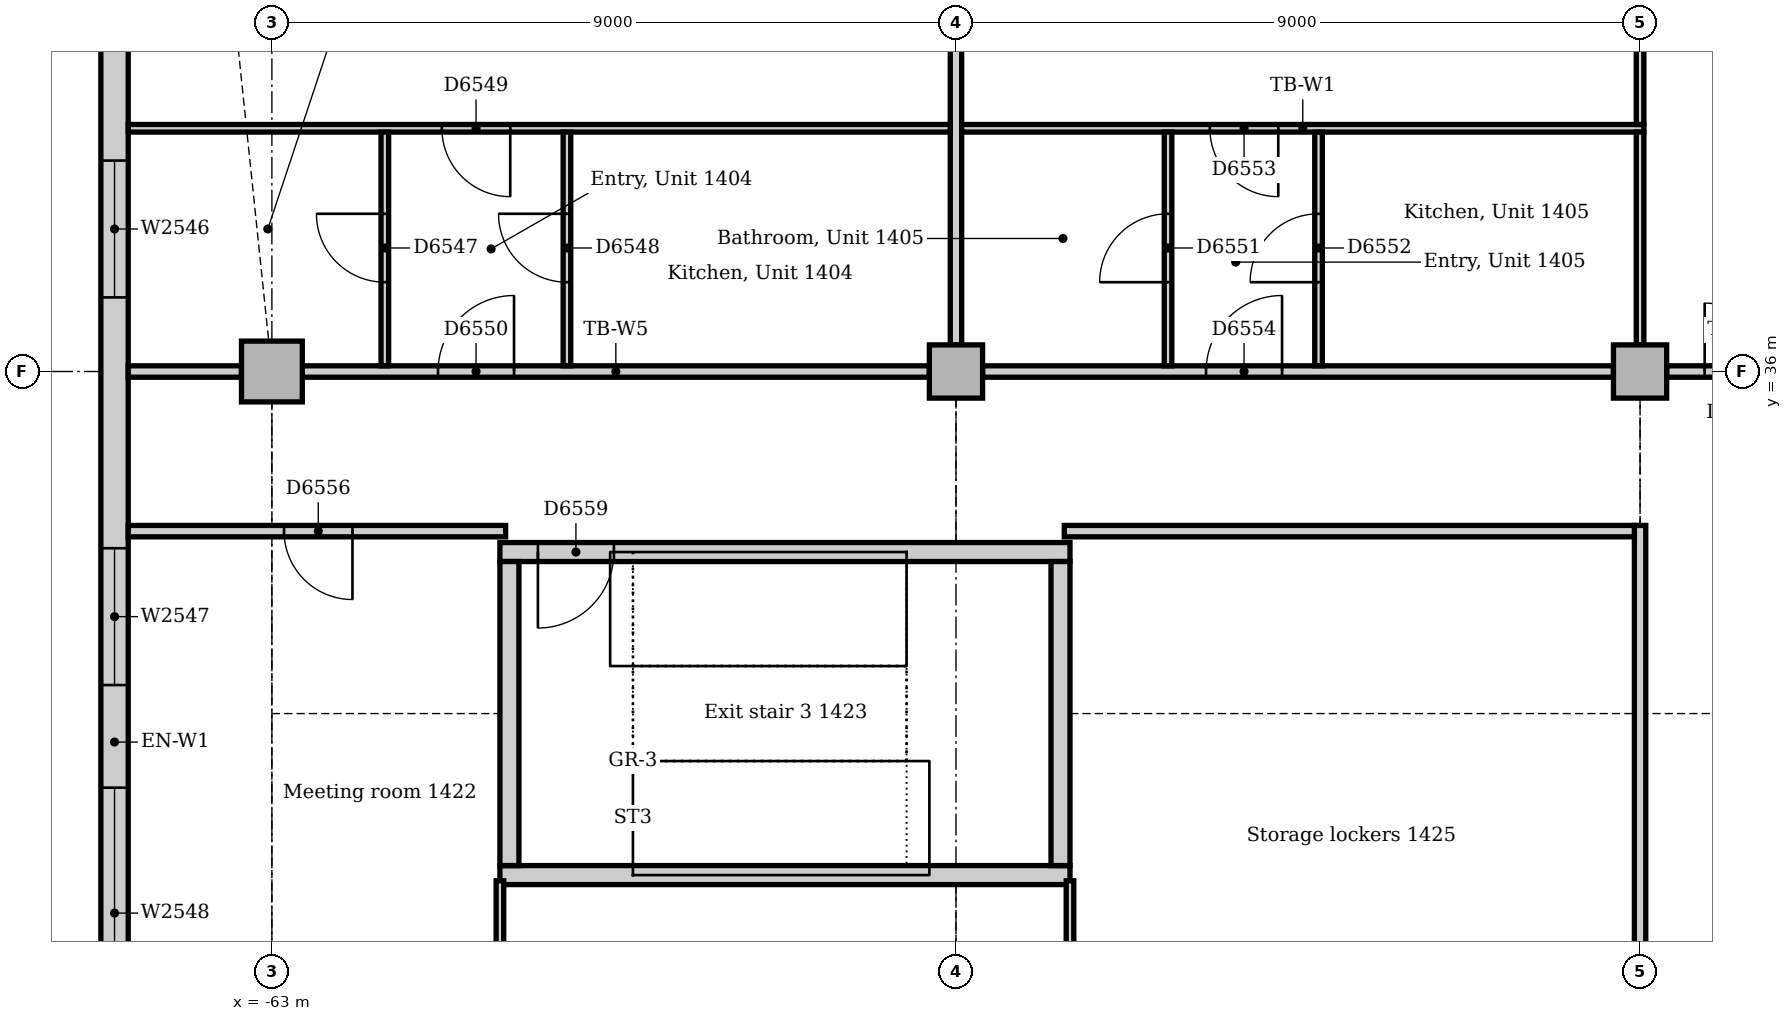
"""IFC4 building model, lengths in metres.
Left out: names, types, materials, properties, quantities, classifications, styles, units other than length and angle.
Written with IfcOpenShell. Run it as: python <this file> out.ifc"""

import sys

from ifc_helpers import new_model, si_unit, direction, frame, frame_2d, origin, origin_2d, place, context, subcontext, project, spatial, rectangle, extrude, element, fill, save


model = new_model("IFC4")
c1 = context("Model", 3, precision=1e-05, world=origin(), true_north=direction((0.0, 1.0)))
c2 = subcontext(c1, "Body", "Model", "MODEL_VIEW")
j1 = project(units=[si_unit("LENGTHUNIT", "METRE"), si_unit("PLANEANGLEUNIT", "RADIAN")], contexts=[c1])
p1 = place(None, origin())
s1 = spatial("IfcSite", under=j1, at=p1, CompositionType="ELEMENT")
p2 = place(p1, origin())
s2 = spatial("IfcBuilding", under=s1, at=p2, CompositionType="ELEMENT")
p3 = place(p2, frame((0.0, 0.0, 63.0)))
s3 = spatial("IfcBuildingStorey", under=s2, at=p3, CompositionType="ELEMENT", Elevation=63.0)
p4 = place(p3, frame((-60.0, 29.375, 0.0), z_axis=(0.0, 0.0, 1.0), x_axis=(1.0, 0.0, 0.0)))
e1 = element("IfcWall", 1, at=p4, inside=s3, PredefinedType="SOLIDWALL", context=c2, shape_type="SweptSolid", body=[
    extrude(rectangle(XDim=7.5, YDim=0.25, at=frame_2d((3.75, 0.0))), origin(), (0.0, 0.0, 1.0), 4.0),
])
p5 = place(p3, frame((-52.5, 33.625, 0.0), z_axis=(0.0, 0.0, 1.0), x_axis=(-1.0, 0.0, 0.0)))
e2 = element("IfcWall", 2, at=p5, inside=s3, PredefinedType="SOLIDWALL", context=c2, shape_type="SweptSolid", body=[
    extrude(rectangle(XDim=7.5, YDim=0.25, at=frame_2d((3.75, 0.0))), origin(), (0.0, 0.0, 1.0), 4.0),
])
p6 = place(p5, frame((6.0, 0.0, 0.0)))
e3 = element("IfcOpeningElement", 3, at=p6, cuts=e2, PredefinedType="OPENING", context=c2, shape_type="SweptSolid", body=[
    extrude(rectangle(XDim=1.0, YDim=2.1, at=frame_2d((0.5, 1.05))), frame((0.0, 0.135, 0.0), z_axis=(0.0, -1.0, 0.0), x_axis=(1.0, 0.0, 0.0)), (0.0, 0.0, 1.0), 0.27),
])
for number, where, z_axis, x_axis in (
    (4, (-52.625, 29.5, 0.0), (0.0, 0.0, 1.0), (0.0, 1.0, 0.0)),
    (5, (-59.875, 33.5, 0.0), (0.0, 0.0, 1.0), (0.0, -1.0, 0.0)),
):
    element("IfcWall", number, at=place(p3, frame(where, z_axis=z_axis, x_axis=x_axis)), inside=s3, PredefinedType="SOLIDWALL", context=c2, shape_type="SweptSolid", body=[
        extrude(rectangle(XDim=4.0, YDim=0.25, at=frame_2d((2.0, 0.0))), origin(), (0.0, 0.0, 1.0), 4.0),
    ])
p7 = place(p3, frame((-63.0, 36.0, 0.0), z_axis=(0.0, 0.0, 1.0), x_axis=(1.0, 0.0, 0.0)))
e6 = element("IfcColumn", 6, at=p7, inside=s3, PredefinedType="COLUMN", context=c2, shape_type="SweptSolid", body=[
    extrude(rectangle(XDim=0.8, YDim=0.8, at=origin_2d()), origin(), (0.0, 0.0, 1.0), 3.85),
])
for number, where, z_axis, x_axis in (
    (7, (-54.0, 36.0, 0.0), (0.0, 0.0, 1.0), (1.0, 0.0, 0.0)),
    (8, (-45.0, 36.0, 0.0), (0.0, 0.0, 1.0), (1.0, 0.0, 0.0)),
):
    element("IfcColumn", number, at=place(p3, frame(where, z_axis=z_axis, x_axis=x_axis)), inside=s3, PredefinedType="COLUMN", context=c2, shape_type="SweptSolid", body=[
        extrude(rectangle(XDim=0.7, YDim=0.7, at=origin_2d()), origin(), (0.0, 0.0, 1.0), 3.85),
    ])
p8 = place(p3, frame((-65.07, 43.007, 0.0), z_axis=(0.0, 0.0, 1.0), x_axis=(0.0, -1.0, 0.0)))
e9 = element("IfcWall", 9, at=p8, inside=s3, PredefinedType="STANDARD", context=c2, shape_type="SweptSolid", body=[
    extrude(rectangle(XDim=23.765, YDim=0.36, at=frame_2d((11.882, 0.0))), origin(), (0.0, 0.0, 1.0), 3.85),
])
p9 = place(p8, frame((4.232, 0.0, 0.9)))
e10 = element("IfcOpeningElement", 10, at=p9, cuts=e9, PredefinedType="OPENING", context=c2, shape_type="SweptSolid", body=[
    extrude(rectangle(XDim=1.8, YDim=1.6, at=frame_2d((0.9, 0.8))), frame((0.0, 0.19, 0.0), z_axis=(0.0, -1.0, 0.0), x_axis=(1.0, 0.0, 0.0)), (0.0, 0.0, 1.0), 0.38),
])
p10 = place(p8, frame((9.332, 0.0, 0.9)))
e11 = element("IfcOpeningElement", 11, at=p10, cuts=e9, PredefinedType="OPENING", context=c2, shape_type="SweptSolid", body=[
    extrude(rectangle(XDim=1.8, YDim=1.6, at=frame_2d((0.9, 0.8))), frame((0.0, 0.19, 0.0), z_axis=(0.0, -1.0, 0.0), x_axis=(1.0, 0.0, 0.0)), (0.0, 0.0, 1.0), 0.38),
])
p11 = place(p8, frame((12.482, 0.0, 0.9)))
e12 = element("IfcOpeningElement", 12, at=p11, cuts=e9, PredefinedType="OPENING", context=c2, shape_type="SweptSolid", body=[
    extrude(rectangle(XDim=3.3, YDim=1.6, at=frame_2d((1.65, 0.8))), frame((0.0, 0.19, 0.0), z_axis=(0.0, -1.0, 0.0), x_axis=(1.0, 0.0, 0.0)), (0.0, 0.0, 1.0), 0.38),
])
p12 = place(p8, frame((16.982, 0.0, 0.9)))
e13 = element("IfcOpeningElement", 13, at=p12, cuts=e9, PredefinedType="OPENING", context=c2, shape_type="SweptSolid", body=[
    extrude(rectangle(XDim=3.3, YDim=1.6, at=frame_2d((1.65, 0.8))), frame((0.0, 0.19, 0.0), z_axis=(0.0, -1.0, 0.0), x_axis=(1.0, 0.0, 0.0)), (0.0, 0.0, 1.0), 0.38),
])
p13 = place(p3, frame((-44.65, 36.0, 0.0), z_axis=(0.0, 0.0, 1.0), x_axis=(1.0, 0.0, 0.0)))
e14 = element("IfcWall", 14, at=p13, inside=s3, PredefinedType="PARTITIONING", context=c2, shape_type="SweptSolid", body=[
    extrude(rectangle(XDim=1.925, YDim=0.15, at=frame_2d((0.963, 0.0))), origin(), (0.0, 0.0, 1.0), 3.602),
])
p14 = place(p13, frame((0.5, 0.0, 0.0)))
e15 = element("IfcOpeningElement", 15, at=p14, cuts=e14, PredefinedType="OPENING", context=c2, shape_type="SweptSolid", body=[
    extrude(rectangle(XDim=0.9, YDim=2.1, at=frame_2d((0.45, 1.05))), frame((0.0, 0.085, 0.0), z_axis=(0.0, -1.0, 0.0), x_axis=(1.0, 0.0, 0.0)), (0.0, 0.0, 1.0), 0.17),
])
p15 = place(p3, frame((-53.65, 36.0, 0.0), z_axis=(0.0, 0.0, 1.0), x_axis=(1.0, 0.0, 0.0)))
e16 = element("IfcWall", 16, at=p15, inside=s3, PredefinedType="PARTITIONING", context=c2, shape_type="SweptSolid", body=[
    extrude(rectangle(XDim=8.3, YDim=0.15, at=frame_2d((4.15, 0.0))), origin(), (0.0, 0.0, 1.0), 3.158),
])
p16 = place(p15, frame((2.94, 0.0, 0.0)))
e17 = element("IfcOpeningElement", 17, at=p16, cuts=e16, PredefinedType="OPENING", context=c2, shape_type="SweptSolid", body=[
    extrude(rectangle(XDim=1.0, YDim=2.1, at=frame_2d((0.5, 1.05))), frame((0.0, 0.085, 0.0), z_axis=(0.0, -1.0, 0.0), x_axis=(1.0, 0.0, 0.0)), (0.0, 0.0, 1.0), 0.17),
])
p17 = place(p3, frame((-62.6, 36.0, 0.0), z_axis=(0.0, 0.0, 1.0), x_axis=(1.0, 0.0, 0.0)))
e18 = element("IfcWall", 18, at=p17, inside=s3, PredefinedType="PARTITIONING", context=c2, shape_type="SweptSolid", body=[
    extrude(rectangle(XDim=8.25, YDim=0.15, at=frame_2d((4.125, 0.0))), origin(), (0.0, 0.0, 1.0), 3.158),
])
p18 = place(p17, frame((1.786, 0.0, 0.0)))
e19 = element("IfcOpeningElement", 19, at=p18, cuts=e18, PredefinedType="OPENING", context=c2, shape_type="SweptSolid", body=[
    extrude(rectangle(XDim=1.0, YDim=2.1, at=frame_2d((0.5, 1.05))), frame((0.0, 0.085, 0.0), z_axis=(0.0, -1.0, 0.0), x_axis=(1.0, 0.0, 0.0)), (0.0, 0.0, 1.0), 0.17),
])
p19 = place(p3, frame((-64.89, 36.0, 0.0), z_axis=(0.0, 0.0, 1.0), x_axis=(1.0, 0.0, 0.0)))
e20 = element("IfcWall", 20, at=p19, inside=s3, PredefinedType="PARTITIONING", context=c2, shape_type="SweptSolid", body=[
    extrude(rectangle(XDim=1.49, YDim=0.15, at=frame_2d((0.745, 0.0))), origin(), (0.0, 0.0, 1.0), 3.85),
])
p20 = place(p3, frame((-45.0, 27.35, 0.0), z_axis=(0.0, 0.0, 1.0), x_axis=(0.0, 1.0, 0.0)))
e21 = element("IfcWall", 21, at=p20, inside=s3, PredefinedType="PARTITIONING", context=c2, shape_type="SweptSolid", body=[
    extrude(rectangle(XDim=6.625, YDim=0.15, at=frame_2d((3.312, 0.0))), origin(), (0.0, 0.0, 1.0), 3.256),
])
p21 = place(p3, frame((-52.575, 33.9, 0.0), z_axis=(0.0, 0.0, 1.0), x_axis=(1.0, 0.0, 0.0)))
e22 = element("IfcWall", 22, at=p21, inside=s3, PredefinedType="PARTITIONING", context=c2, shape_type="SweptSolid", body=[
    extrude(rectangle(XDim=7.5, YDim=0.15, at=frame_2d((3.75, 0.0))), origin(), (0.0, 0.0, 1.0), 3.85),
])
p22 = place(p3, frame((-64.89, 33.9, 0.0), z_axis=(0.0, 0.0, 1.0), x_axis=(1.0, 0.0, 0.0)))
e23 = element("IfcWall", 23, at=p22, inside=s3, PredefinedType="PARTITIONING", context=c2, shape_type="SweptSolid", body=[
    extrude(rectangle(XDim=4.965, YDim=0.15, at=frame_2d((2.482, 0.0))), origin(), (0.0, 0.0, 1.0), 3.85),
])
p23 = place(p22, frame((2.05, 0.0, 0.0)))
e24 = element("IfcOpeningElement", 24, at=p23, cuts=e23, PredefinedType="OPENING", context=c2, shape_type="SweptSolid", body=[
    extrude(rectangle(XDim=0.9, YDim=2.1, at=frame_2d((0.45, 1.05))), frame((0.0, 0.085, 0.0), z_axis=(0.0, -1.0, 0.0), x_axis=(1.0, 0.0, 0.0)), (0.0, 0.0, 1.0), 0.17),
])
p24 = place(p3, frame((-54.0, 36.35, 0.0), z_axis=(0.0, 0.0, 1.0), x_axis=(0.0, 1.0, 0.0)))
e25 = element("IfcWall", 25, at=p24, inside=s3, PredefinedType="PARTITIONING", context=c2, shape_type="SweptSolid", body=[
    extrude(rectangle(XDim=9.6, YDim=0.15, at=frame_2d((4.8, 0.0))), origin(), (0.0, 0.0, 1.0), 3.256),
])
p25 = place(p3, frame((-53.925, 39.2, 0.0), z_axis=(0.0, 0.0, 1.0), x_axis=(1.0, 0.0, 0.0)))
e26 = element("IfcWall", 26, at=p25, inside=s3, PredefinedType="PARTITIONING", context=c2, shape_type="SweptSolid", body=[
    extrude(rectangle(XDim=8.975, YDim=0.1, at=frame_2d((4.487, 0.0))), origin(), (0.0, 0.0, 1.0), 3.85),
])
p26 = place(p25, frame((3.265, 0.0, 0.0)))
e27 = element("IfcOpeningElement", 27, at=p26, cuts=e26, PredefinedType="OPENING", context=c2, shape_type="SweptSolid", body=[
    extrude(rectangle(XDim=0.9, YDim=2.1, at=frame_2d((0.45, 1.05))), frame((0.0, 0.06, 0.0), z_axis=(0.0, -1.0, 0.0), x_axis=(1.0, 0.0, 0.0)), (0.0, 0.0, 1.0), 0.12),
])
p27 = place(p3, frame((-64.89, 39.2, 0.0), z_axis=(0.0, 0.0, 1.0), x_axis=(1.0, 0.0, 0.0)))
e28 = element("IfcWall", 28, at=p27, inside=s3, PredefinedType="PARTITIONING", context=c2, shape_type="SweptSolid", body=[
    extrude(rectangle(XDim=10.815, YDim=0.1, at=frame_2d((5.407, 0.0))), origin(), (0.0, 0.0, 1.0), 3.85),
])
p28 = place(p27, frame((4.126, 0.0, 0.0)))
e29 = element("IfcOpeningElement", 29, at=p28, cuts=e28, PredefinedType="OPENING", context=c2, shape_type="SweptSolid", body=[
    extrude(rectangle(XDim=0.9, YDim=2.1, at=frame_2d((0.45, 1.05))), frame((0.0, 0.06, 0.0), z_axis=(0.0, -1.0, 0.0), x_axis=(1.0, 0.0, 0.0)), (0.0, 0.0, 1.0), 0.12),
])
p29 = place(p3, frame((-45.0, 39.25, 0.0), z_axis=(0.0, 0.0, 1.0), x_axis=(0.0, 1.0, 0.0)))
e30 = element("IfcWall", 30, at=p29, inside=s3, PredefinedType="PARTITIONING", context=c2, shape_type="SweptSolid", body=[
    extrude(rectangle(XDim=6.7, YDim=0.1, at=frame_2d((3.35, 0.0))), origin(), (0.0, 0.0, 1.0), 3.256),
])
p30 = place(p3, frame((-45.0, 36.35, 0.0), z_axis=(0.0, 0.0, 1.0), x_axis=(0.0, 1.0, 0.0)))
e31 = element("IfcWall", 31, at=p30, inside=s3, PredefinedType="PARTITIONING", context=c2, shape_type="SweptSolid", body=[
    extrude(rectangle(XDim=2.8, YDim=0.1, at=frame_2d((1.4, 0.0))), origin(), (0.0, 0.0, 1.0), 3.256),
])
for number, where, z_axis, x_axis in (
    (32, (-60.0, 20.075, 0.0), (0.0, 0.0, 1.0), (0.0, 1.0, 0.0)),
    (33, (-52.5, 20.075, 0.0), (0.0, 0.0, 1.0), (0.0, 1.0, 0.0)),
):
    element("IfcWall", number, at=place(p3, frame(where, z_axis=z_axis, x_axis=x_axis)), inside=s3, PredefinedType="PARTITIONING", context=c2, shape_type="SweptSolid", body=[
        extrude(rectangle(XDim=9.225, YDim=0.1, at=frame_2d((4.612, 0.0))), origin(), (0.0, 0.0, 1.0), 3.85),
    ])
p31 = place(p3, frame((-61.514, 36.075, 0.0), z_axis=(0.0, 0.0, 1.0), x_axis=(0.0, 1.0, 0.0)))
e34 = element("IfcWall", 34, at=p31, inside=s3, PredefinedType="PARTITIONING", context=c2, shape_type="SweptSolid", body=[
    extrude(rectangle(XDim=3.075, YDim=0.1, at=frame_2d((1.538, 0.0))), origin(), (0.0, 0.0, 1.0), 3.85),
])
p32 = place(p31, frame((1.1, 0.0, 0.0)))
e35 = element("IfcOpeningElement", 35, at=p32, cuts=e34, PredefinedType="OPENING", context=c2, shape_type="SweptSolid", body=[
    extrude(rectangle(XDim=0.9, YDim=2.1, at=frame_2d((0.45, 1.05))), frame((0.0, 0.06, 0.0), z_axis=(0.0, -1.0, 0.0), x_axis=(1.0, 0.0, 0.0)), (0.0, 0.0, 1.0), 0.12),
])
p33 = place(p3, frame((-59.118, 36.075, 0.0), z_axis=(0.0, 0.0, 1.0), x_axis=(0.0, 1.0, 0.0)))
e36 = element("IfcWall", 36, at=p33, inside=s3, PredefinedType="PARTITIONING", context=c2, shape_type="SweptSolid", body=[
    extrude(rectangle(XDim=3.075, YDim=0.1, at=frame_2d((1.538, 0.0))), origin(), (0.0, 0.0, 1.0), 3.85),
])
p34 = place(p33, frame((1.1, 0.0, 0.0)))
e37 = element("IfcOpeningElement", 37, at=p34, cuts=e36, PredefinedType="OPENING", context=c2, shape_type="SweptSolid", body=[
    extrude(rectangle(XDim=0.9, YDim=2.1, at=frame_2d((0.45, 1.05))), frame((0.0, 0.06, 0.0), z_axis=(0.0, -1.0, 0.0), x_axis=(1.0, 0.0, 0.0)), (0.0, 0.0, 1.0), 0.12),
])
p35 = place(p3, frame((-51.21, 36.075, 0.0), z_axis=(0.0, 0.0, 1.0), x_axis=(0.0, 1.0, 0.0)))
e38 = element("IfcWall", 38, at=p35, inside=s3, PredefinedType="PARTITIONING", context=c2, shape_type="SweptSolid", body=[
    extrude(rectangle(XDim=3.075, YDim=0.1, at=frame_2d((1.538, 0.0))), origin(), (0.0, 0.0, 1.0), 3.85),
])
p36 = place(p35, frame((1.1, 0.0, 0.0)))
e39 = element("IfcOpeningElement", 39, at=p36, cuts=e38, PredefinedType="OPENING", context=c2, shape_type="SweptSolid", body=[
    extrude(rectangle(XDim=0.9, YDim=2.1, at=frame_2d((0.45, 1.05))), frame((0.0, 0.06, 0.0), z_axis=(0.0, -1.0, 0.0), x_axis=(1.0, 0.0, 0.0)), (0.0, 0.0, 1.0), 0.12),
])
p37 = place(p3, frame((-49.23, 36.075, 0.0), z_axis=(0.0, 0.0, 1.0), x_axis=(0.0, 1.0, 0.0)))
e40 = element("IfcWall", 40, at=p37, inside=s3, PredefinedType="PARTITIONING", context=c2, shape_type="SweptSolid", body=[
    extrude(rectangle(XDim=3.075, YDim=0.1, at=frame_2d((1.538, 0.0))), origin(), (0.0, 0.0, 1.0), 3.85),
])
p38 = place(p37, frame((1.1, 0.0, 0.0)))
e41 = element("IfcOpeningElement", 41, at=p38, cuts=e40, PredefinedType="OPENING", context=c2, shape_type="SweptSolid", body=[
    extrude(rectangle(XDim=0.9, YDim=2.1, at=frame_2d((0.45, 1.05))), frame((0.0, 0.06, 0.0), z_axis=(0.0, -1.0, 0.0), x_axis=(1.0, 0.0, 0.0)), (0.0, 0.0, 1.0), 0.12),
])
p39 = place(p9, origin())
e42 = element("IfcWindow", 42, at=p39, inside=s3, PartitioningType="SINGLE_PANEL", PredefinedType="WINDOW", context=c2, shape_type="SweptSolid", body=[
    extrude(rectangle(XDim=1.8, YDim=1.6, at=frame_2d((0.9, 0.8))), frame((0.0, 0.13, 0.0), z_axis=(0.0, -1.0, 0.0), x_axis=(1.0, 0.0, 0.0)), (0.0, 0.0, 1.0), 0.06),
])
fill(e10, e42)
p40 = place(p10, origin())
e43 = element("IfcWindow", 43, at=p40, inside=s3, PartitioningType="SINGLE_PANEL", PredefinedType="WINDOW", context=c2, shape_type="SweptSolid", body=[
    extrude(rectangle(XDim=1.8, YDim=1.6, at=frame_2d((0.9, 0.8))), frame((0.0, 0.13, 0.0), z_axis=(0.0, -1.0, 0.0), x_axis=(1.0, 0.0, 0.0)), (0.0, 0.0, 1.0), 0.06),
])
fill(e11, e43)
p41 = place(p11, origin())
e44 = element("IfcWindow", 44, at=p41, inside=s3, PartitioningType="SINGLE_PANEL", PredefinedType="WINDOW", context=c2, shape_type="SweptSolid", body=[
    extrude(rectangle(XDim=3.3, YDim=1.6, at=frame_2d((1.65, 0.8))), frame((0.0, 0.13, 0.0), z_axis=(0.0, -1.0, 0.0), x_axis=(1.0, 0.0, 0.0)), (0.0, 0.0, 1.0), 0.06),
])
fill(e12, e44)
p42 = place(p14, origin())
e45 = element("IfcDoor", 45, at=p42, inside=s3, OperationType="SINGLE_SWING_LEFT", PredefinedType="DOOR", context=c2, shape_type="SweptSolid", body=[
    extrude(rectangle(XDim=0.9, YDim=2.1, at=frame_2d((0.45, 1.05))), frame((0.0, 0.025, 0.0), z_axis=(0.0, -1.0, 0.0), x_axis=(1.0, 0.0, 0.0)), (0.0, 0.0, 1.0), 0.05),
])
fill(e15, e45)
p43 = place(p32, origin())
e46 = element("IfcDoor", 46, at=p43, inside=s3, OperationType="SINGLE_SWING_RIGHT", PredefinedType="DOOR", context=c2, shape_type="SweptSolid", body=[
    extrude(rectangle(XDim=0.9, YDim=2.1, at=frame_2d((0.45, 1.05))), frame((0.0, 0.025, 0.0), z_axis=(0.0, -1.0, 0.0), x_axis=(1.0, 0.0, 0.0)), (0.0, 0.0, 1.0), 0.05),
])
fill(e35, e46)
p44 = place(p34, origin())
e47 = element("IfcDoor", 47, at=p44, inside=s3, OperationType="SINGLE_SWING_RIGHT", PredefinedType="DOOR", context=c2, shape_type="SweptSolid", body=[
    extrude(rectangle(XDim=0.9, YDim=2.1, at=frame_2d((0.45, 1.05))), frame((0.0, 0.025, 0.0), z_axis=(0.0, -1.0, 0.0), x_axis=(1.0, 0.0, 0.0)), (0.0, 0.0, 1.0), 0.05),
])
fill(e37, e47)
p45 = place(p28, frame((0.9, 0.0, 0.0), z_axis=(0.0, 0.0, 1.0), x_axis=(-1.0, 0.0, 0.0)))
e48 = element("IfcDoor", 48, at=p45, inside=s3, OperationType="SINGLE_SWING_LEFT", PredefinedType="DOOR", context=c2, shape_type="SweptSolid", body=[
    extrude(rectangle(XDim=0.9, YDim=2.1, at=frame_2d((0.45, 1.05))), frame((0.0, 0.025, 0.0), z_axis=(0.0, -1.0, 0.0), x_axis=(1.0, 0.0, 0.0)), (0.0, 0.0, 1.0), 0.05),
])
fill(e29, e48)
p46 = place(p18, origin())
e49 = element("IfcDoor", 49, at=p46, inside=s3, OperationType="SINGLE_SWING_RIGHT", PredefinedType="DOOR", context=c2, shape_type="SweptSolid", body=[
    extrude(rectangle(XDim=1.0, YDim=2.1, at=frame_2d((0.5, 1.05))), frame((0.0, 0.025, 0.0), z_axis=(0.0, -1.0, 0.0), x_axis=(1.0, 0.0, 0.0)), (0.0, 0.0, 1.0), 0.05),
])
fill(e19, e49)
p47 = place(p36, origin())
e50 = element("IfcDoor", 50, at=p47, inside=s3, OperationType="SINGLE_SWING_LEFT", PredefinedType="DOOR", context=c2, shape_type="SweptSolid", body=[
    extrude(rectangle(XDim=0.9, YDim=2.1, at=frame_2d((0.45, 1.05))), frame((0.0, 0.025, 0.0), z_axis=(0.0, -1.0, 0.0), x_axis=(1.0, 0.0, 0.0)), (0.0, 0.0, 1.0), 0.05),
])
fill(e39, e50)
p48 = place(p38, origin())
e51 = element("IfcDoor", 51, at=p48, inside=s3, OperationType="SINGLE_SWING_LEFT", PredefinedType="DOOR", context=c2, shape_type="SweptSolid", body=[
    extrude(rectangle(XDim=0.9, YDim=2.1, at=frame_2d((0.45, 1.05))), frame((0.0, 0.025, 0.0), z_axis=(0.0, -1.0, 0.0), x_axis=(1.0, 0.0, 0.0)), (0.0, 0.0, 1.0), 0.05),
])
fill(e41, e51)
p49 = place(p26, frame((0.9, 0.0, 0.0), z_axis=(0.0, 0.0, 1.0), x_axis=(-1.0, 0.0, 0.0)))
e52 = element("IfcDoor", 52, at=p49, inside=s3, OperationType="SINGLE_SWING_LEFT", PredefinedType="DOOR", context=c2, shape_type="SweptSolid", body=[
    extrude(rectangle(XDim=0.9, YDim=2.1, at=frame_2d((0.45, 1.05))), frame((0.0, 0.025, 0.0), z_axis=(0.0, -1.0, 0.0), x_axis=(1.0, 0.0, 0.0)), (0.0, 0.0, 1.0), 0.05),
])
fill(e27, e52)
p50 = place(p16, origin())
e53 = element("IfcDoor", 53, at=p50, inside=s3, OperationType="SINGLE_SWING_RIGHT", PredefinedType="DOOR", context=c2, shape_type="SweptSolid", body=[
    extrude(rectangle(XDim=1.0, YDim=2.1, at=frame_2d((0.5, 1.05))), frame((0.0, 0.025, 0.0), z_axis=(0.0, -1.0, 0.0), x_axis=(1.0, 0.0, 0.0)), (0.0, 0.0, 1.0), 0.05),
])
fill(e17, e53)
p51 = place(p23, frame((0.9, 0.0, 0.0), z_axis=(0.0, 0.0, 1.0), x_axis=(-1.0, 0.0, 0.0)))
e54 = element("IfcDoor", 54, at=p51, inside=s3, OperationType="SINGLE_SWING_LEFT", PredefinedType="DOOR", context=c2, shape_type="SweptSolid", body=[
    extrude(rectangle(XDim=0.9, YDim=2.1, at=frame_2d((0.45, 1.05))), frame((0.0, 0.025, 0.0), z_axis=(0.0, -1.0, 0.0), x_axis=(1.0, 0.0, 0.0)), (0.0, 0.0, 1.0), 0.05),
])
fill(e24, e54)
p52 = place(p6, origin())
e55 = element("IfcDoor", 55, at=p52, inside=s3, OperationType="SINGLE_SWING_RIGHT", PredefinedType="DOOR", context=c2, shape_type="SweptSolid", body=[
    extrude(rectangle(XDim=1.0, YDim=2.1, at=frame_2d((0.5, 1.05))), frame((0.0, 0.025, 0.0), z_axis=(0.0, -1.0, 0.0), x_axis=(1.0, 0.0, 0.0)), (0.0, 0.0, 1.0), 0.05),
])
fill(e3, e55)
save(model, sys.argv[1])
